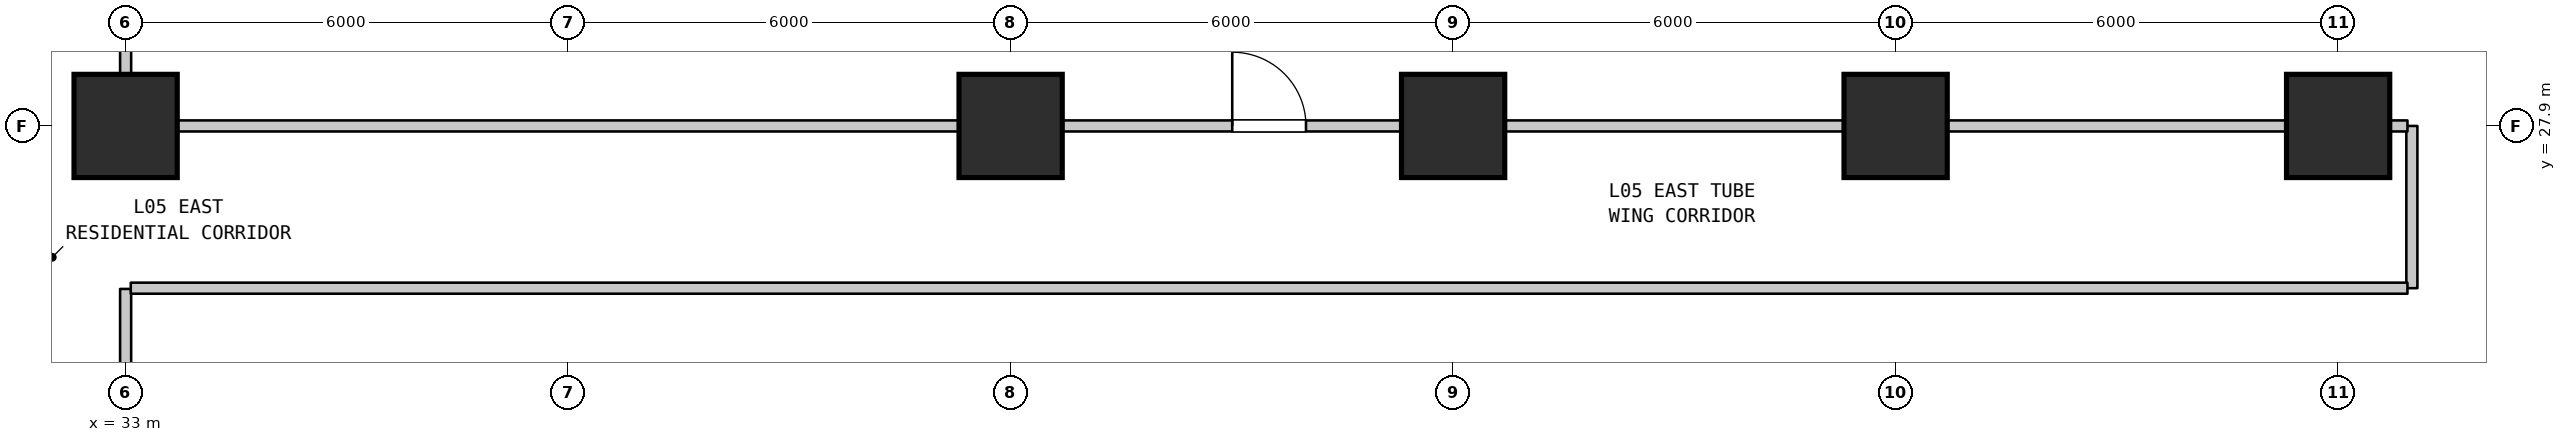
"""IFC4 building model, lengths in metres.
Left out: names, types, materials, properties, quantities, classifications, styles, units other than length and angle.
Written with IfcOpenShell. Run it as: python <this file> out.ifc"""

import sys

from ifc_helpers import new_model, si_unit, direction, frame, frame_2d, origin, origin_2d, place, context, subcontext, project, spatial, rectangle, extrude, element, fill, save


model = new_model("IFC4")
c1 = context("Model", 3, precision=1e-05, world=origin(), true_north=direction((0.0, 1.0)))
c2 = subcontext(c1, "Body", "Model", "MODEL_VIEW")
j1 = project(units=[si_unit("LENGTHUNIT", "METRE"), si_unit("PLANEANGLEUNIT", "RADIAN")], contexts=[c1])
p1 = place(None, origin())
s1 = spatial("IfcSite", under=j1, at=p1, CompositionType="ELEMENT")
p2 = place(p1, origin())
s2 = spatial("IfcBuilding", under=s1, at=p2, CompositionType="ELEMENT")
p3 = place(p2, frame((0.0, 0.0, 27.7)))
s3 = spatial("IfcBuildingStorey", under=s2, at=p3, CompositionType="ELEMENT", Elevation=27.7)
for number, where, z_axis, x_axis in (
    (1, (33.0, 27.9, 0.0), (0.0, 0.0, 1.0), (1.0, 0.0, 0.0)),
    (2, (45.0, 27.9, 0.0), (0.0, 0.0, 1.0), (1.0, 0.0, 0.0)),
    (3, (51.0, 27.9, 0.0), (0.0, 0.0, 1.0), (1.0, 0.0, 0.0)),
    (4, (57.0, 27.9, 0.0), (0.0, 0.0, 1.0), (1.0, 0.0, 0.0)),
    (5, (63.0, 27.9, 0.0), (0.0, 0.0, 1.0), (1.0, 0.0, 0.0)),
):
    element("IfcColumn", number, at=place(p3, frame(where, z_axis=z_axis, x_axis=x_axis)), inside=s3, PredefinedType="COLUMN", context=c2, shape_type="SweptSolid", body=[
        extrude(rectangle(XDim=1.4, YDim=1.4, at=origin_2d()), origin(), (0.0, 0.0, 1.0), 3.7),
    ])
p4 = place(p3, frame((33.0, 19.66, 0.0), z_axis=(0.0, 0.0, 1.0), x_axis=(0.0, 1.0, 0.0)))
e6 = element("IfcWall", 6, at=p4, inside=s3, PredefinedType="STANDARD", context=c2, shape_type="SweptSolid", body=[
    extrude(rectangle(XDim=6.03, YDim=0.15, at=frame_2d((3.015, 0.0))), origin(), (0.0, 0.0, 1.0), 2.885),
])
p5 = place(p3, frame((33.0, 27.91, 0.0), z_axis=(0.0, 0.0, 1.0), x_axis=(0.0, 1.0, 0.0)))
e7 = element("IfcWall", 7, at=p5, inside=s3, PredefinedType="STANDARD", context=c2, shape_type="SweptSolid", body=[
    extrude(rectangle(XDim=9.98, YDim=0.15, at=frame_2d((4.99, 0.0))), origin(), (0.0, 0.0, 1.0), 2.885),
])
p6 = place(p3, frame((64.0, 25.7, 0.0), z_axis=(0.0, 0.0, 1.0), x_axis=(0.0, 1.0, 0.0)))
e8 = element("IfcWall", 8, at=p6, inside=s3, PredefinedType="STANDARD", context=c2, shape_type="SweptSolid", body=[
    extrude(rectangle(XDim=2.2, YDim=0.15, at=frame_2d((1.1, 0.0))), origin(), (0.0, 0.0, 1.0), 3.385),
])
p7 = place(p3, frame((33.07, 25.7, 0.0), z_axis=(0.0, 0.0, 1.0), x_axis=(1.0, 0.0, 0.0)))
e9 = element("IfcWall", 9, at=p7, inside=s3, PredefinedType="STANDARD", context=c2, shape_type="SweptSolid", body=[
    extrude(rectangle(XDim=30.87, YDim=0.15, at=frame_2d((15.435, 0.0))), origin(), (0.0, 0.0, 1.0), 3.385),
])
p8 = place(p3, frame((33.07, 27.9, 0.0), z_axis=(0.0, 0.0, 1.0), x_axis=(1.0, 0.0, 0.0)))
e10 = element("IfcWall", 10, at=p8, inside=s3, PredefinedType="STANDARD", context=c2, shape_type="SweptSolid", body=[
    extrude(rectangle(XDim=30.87, YDim=0.15, at=frame_2d((15.435, 0.0))), origin(), (0.0, 0.0, 1.0), 2.885),
])
p9 = place(p8, frame((14.935, 0.0, 0.0)))
e11 = element("IfcOpeningElement", 11, at=p9, cuts=e10, PredefinedType="OPENING", context=c2, shape_type="SweptSolid", body=[
    extrude(rectangle(XDim=1.0, YDim=2.15, at=frame_2d((0.5, 1.075))), frame((0.0, 0.085, 0.0), z_axis=(0.0, -1.0, 0.0), x_axis=(1.0, 0.0, 0.0)), (0.0, 0.0, 1.0), 0.17),
])
p10 = place(p9, origin())
e12 = element("IfcDoor", 12, at=p10, inside=s3, OperationType="SINGLE_SWING_LEFT", PredefinedType="DOOR", context=c2, shape_type="SweptSolid", body=[
    extrude(rectangle(XDim=1.0, YDim=2.15, at=frame_2d((0.5, 1.075))), frame((0.0, 0.025, 0.0), z_axis=(0.0, -1.0, 0.0), x_axis=(1.0, 0.0, 0.0)), (0.0, 0.0, 1.0), 0.05),
])
fill(e11, e12)
save(model, sys.argv[1])
